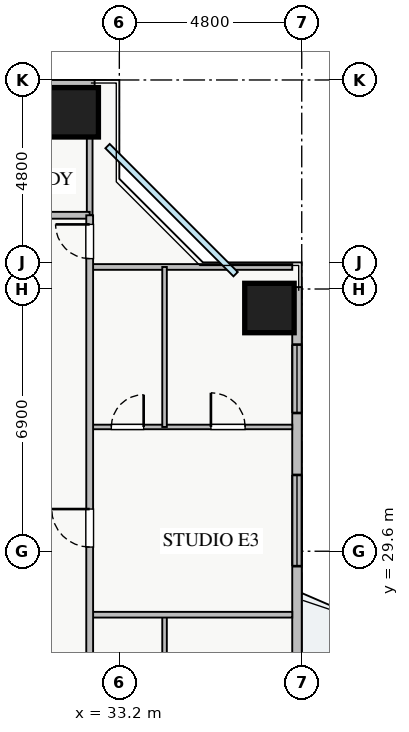
"""IFC4 building model, lengths in metres.
Left out: names, types, materials, properties, quantities, classifications, styles, units other than length and angle.
Written with IfcOpenShell. Run it as: python <this file> out.ifc"""

import sys

from ifc_helpers import new_model, si_unit, direction, frame, frame_2d, origin, origin_2d, place, context, subcontext, project, spatial, rectangle, extrude, source, transform, mapped, element, fill, save


model = new_model("IFC4")
c1 = context("Model", 3, precision=1e-05, world=origin(), true_north=direction((0.0, 1.0)))
c2 = subcontext(c1, "Body", "Model", "MODEL_VIEW")
j1 = project(units=[si_unit("LENGTHUNIT", "METRE"), si_unit("PLANEANGLEUNIT", "RADIAN")], contexts=[c1])
p1 = place(None, origin())
s1 = spatial("IfcSite", under=j1, at=p1, CompositionType="ELEMENT")
p2 = place(p1, origin())
s2 = spatial("IfcBuilding", under=s1, at=p2, CompositionType="ELEMENT")
p3 = place(p2, frame((0.0, 0.0, 79.5)))
s3 = spatial("IfcBuildingStorey", under=s2, at=p3, CompositionType="ELEMENT", Elevation=79.5)
m1 = source(origin(), c2, "Body", "SweptSolid", [
    extrude(rectangle(XDim=1.3, YDim=1.3, at=origin_2d()), origin(), (0.0, 0.0, 1.0), 3.25),
])
for number, where, z_axis, x_axis in (
    (1, (37.15, 36.0, 0.0), (0.0, 0.0, 1.0), (1.0, 0.0, 0.0)),
    (2, (32.0, 41.15, 0.0), (0.0, 0.0, 1.0), (1.0, 0.0, 0.0)),
):
    element("IfcColumn", number, at=place(p3, frame(where, z_axis=z_axis, x_axis=x_axis)), inside=s3, PredefinedType="COLUMN", context=c2, shape_type="MappedRepresentation", body=[
        mapped(m1, transform((0.0, 0.0, 0.0), x_axis=(1.0, 0.0, 0.0), y_axis=(0.0, 1.0, 0.0), z_axis=(0.0, 0.0, 1.0), scale=1.0)),
    ])
p4 = place(p3, frame((5.45, 41.875, 0.0), z_axis=(0.0, 0.0, 1.0), x_axis=(1.0, 0.0, 0.0)))
e3 = element("IfcWall", 3, at=p4, inside=s3, PredefinedType="STANDARD", context=c2, shape_type="SweptSolid", body=[
    extrude(rectangle(XDim=27.1, YDim=0.25, at=frame_2d((13.55, 0.0))), origin(), (0.0, 0.0, 1.0), 2.61),
])
p5 = place(p4, frame((14.4, 0.0, 0.0)))
e4 = element("IfcOpeningElement", 4, at=p5, cuts=e3, PredefinedType="OPENING", context=c2, shape_type="SweptSolid", body=[
    extrude(rectangle(XDim=1.2, YDim=2.1, at=frame_2d((0.6, 1.05))), frame((0.0, 0.135, 0.0), z_axis=(0.0, -1.0, 0.0), x_axis=(1.0, 0.0, 0.0)), (0.0, 0.0, 1.0), 0.27),
])
p6 = place(p4, frame((1.365, 0.0, 0.9)))
e5 = element("IfcOpeningElement", 5, at=p6, cuts=e3, PredefinedType="OPENING", context=c2, shape_type="SweptSolid", body=[
    extrude(rectangle(XDim=1.8, YDim=1.5, at=frame_2d((0.9, 0.75))), frame((0.0, 0.135, 0.0), z_axis=(0.0, -1.0, 0.0), x_axis=(1.0, 0.0, 0.0)), (0.0, 0.0, 1.0), 0.27),
])
p7 = place(p4, frame((9.263, 0.0, 0.9)))
e6 = element("IfcOpeningElement", 6, at=p7, cuts=e3, PredefinedType="OPENING", context=c2, shape_type="SweptSolid", body=[
    extrude(rectangle(XDim=1.8, YDim=1.45, at=frame_2d((0.9, 0.725))), frame((0.0, 0.135, 0.0), z_axis=(0.0, -1.0, 0.0), x_axis=(1.0, 0.0, 0.0)), (0.0, 0.0, 1.0), 0.27),
])
p8 = place(p4, frame((16.188, 0.0, 0.9)))
e7 = element("IfcOpeningElement", 7, at=p8, cuts=e3, PredefinedType="OPENING", context=c2, shape_type="SweptSolid", body=[
    extrude(rectangle(XDim=1.5, YDim=1.45, at=frame_2d((0.75, 0.725))), frame((0.0, 0.135, 0.0), z_axis=(0.0, -1.0, 0.0), x_axis=(1.0, 0.0, 0.0)), (0.0, 0.0, 1.0), 0.27),
])
p9 = place(p4, frame((22.663, 0.0, 0.9)))
e8 = element("IfcOpeningElement", 8, at=p9, cuts=e3, PredefinedType="OPENING", context=c2, shape_type="SweptSolid", body=[
    extrude(rectangle(XDim=2.1, YDim=1.48, at=frame_2d((1.05, 0.74))), frame((0.0, 0.135, 0.0), z_axis=(0.0, -1.0, 0.0), x_axis=(1.0, 0.0, 0.0)), (0.0, 0.0, 1.0), 0.27),
])
p10 = place(p4, frame((5.149, 0.0, 0.9)))
e9 = element("IfcOpeningElement", 9, at=p10, cuts=e3, PredefinedType="OPENING", context=c2, shape_type="SweptSolid", body=[
    extrude(rectangle(XDim=2.4, YDim=1.5, at=frame_2d((1.2, 0.75))), frame((0.0, 0.135, 0.0), z_axis=(0.0, -1.0, 0.0), x_axis=(1.0, 0.0, 0.0)), (0.0, 0.0, 1.0), 0.27),
])
p11 = place(p3, frame((37.875, 9.45, 0.0), z_axis=(0.0, 0.0, 1.0), x_axis=(0.0, 1.0, 0.0)))
e10 = element("IfcWall", 10, at=p11, inside=s3, PredefinedType="STANDARD", context=c2, shape_type="SweptSolid", body=[
    extrude(rectangle(XDim=27.1, YDim=0.25, at=frame_2d((13.55, 0.0))), origin(), (0.0, 0.0, 1.0), 2.61),
])
p12 = place(p11, frame((14.4, 0.0, 0.0)))
e11 = element("IfcOpeningElement", 11, at=p12, cuts=e10, PredefinedType="OPENING", context=c2, shape_type="SweptSolid", body=[
    extrude(rectangle(XDim=1.2, YDim=2.1, at=frame_2d((0.6, 1.05))), frame((0.0, 0.135, 0.0), z_axis=(0.0, -1.0, 0.0), x_axis=(1.0, 0.0, 0.0)), (0.0, 0.0, 1.0), 0.27),
])
p13 = place(p11, frame((2.188, 0.0, 0.9)))
e12 = element("IfcOpeningElement", 12, at=p13, cuts=e10, PredefinedType="OPENING", context=c2, shape_type="SweptSolid", body=[
    extrude(rectangle(XDim=2.4, YDim=1.48, at=frame_2d((1.2, 0.74))), frame((0.0, 0.135, 0.0), z_axis=(0.0, -1.0, 0.0), x_axis=(1.0, 0.0, 0.0)), (0.0, 0.0, 1.0), 0.27),
])
p14 = place(p11, frame((23.788, 0.0, 0.9)))
e13 = element("IfcOpeningElement", 13, at=p14, cuts=e10, PredefinedType="OPENING", context=c2, shape_type="SweptSolid", body=[
    extrude(rectangle(XDim=1.8, YDim=1.5, at=frame_2d((0.9, 0.75))), frame((0.0, 0.135, 0.0), z_axis=(0.0, -1.0, 0.0), x_axis=(1.0, 0.0, 0.0)), (0.0, 0.0, 1.0), 0.27),
])
p15 = place(p11, frame((19.758, 0.0, 0.9)))
e14 = element("IfcOpeningElement", 14, at=p15, cuts=e10, PredefinedType="OPENING", context=c2, shape_type="SweptSolid", body=[
    extrude(rectangle(XDim=2.4, YDim=1.5, at=frame_2d((1.2, 0.75))), frame((0.0, 0.135, 0.0), z_axis=(0.0, -1.0, 0.0), x_axis=(1.0, 0.0, 0.0)), (0.0, 0.0, 1.0), 0.27),
])
p16 = place(p11, frame((8.635, 0.0, 0.9)))
e15 = element("IfcOpeningElement", 15, at=p16, cuts=e10, PredefinedType="OPENING", context=c2, shape_type="SweptSolid", body=[
    extrude(rectangle(XDim=0.9, YDim=1.2, at=frame_2d((0.45, 0.6))), frame((0.0, 0.135, 0.0), z_axis=(0.0, -1.0, 0.0), x_axis=(1.0, 0.0, 0.0)), (0.0, 0.0, 1.0), 0.27),
])
p17 = place(p3, frame((32.42, 38.44, 0.0), z_axis=(0.0, 0.0, 1.0), x_axis=(0.0, 1.0, 0.0)))
e16 = element("IfcWall", 16, at=p17, inside=s3, PredefinedType="PARTITIONING", context=c2, shape_type="SweptSolid", body=[
    extrude(rectangle(XDim=3.31, YDim=0.15, at=frame_2d((1.655, 0.0))), origin(), (0.0, 0.0, 1.0), 3.07),
])
p18 = place(p3, frame((8.85, 38.44, 0.0), z_axis=(0.0, 0.0, 1.0), x_axis=(1.0, 0.0, 0.0)))
e17 = element("IfcWall", 17, at=p18, inside=s3, PredefinedType="PARTITIONING", context=c2, shape_type="SweptSolid", body=[
    extrude(rectangle(XDim=23.57, YDim=0.18, at=frame_2d((11.785, 0.0))), origin(), (0.0, 0.0, 1.0), 3.07),
])
p19 = place(p18, frame((4.625, 0.0, 0.0)))
e18 = element("IfcOpeningElement", 18, at=p19, cuts=e17, PredefinedType="OPENING", context=c2, shape_type="SweptSolid", body=[
    extrude(rectangle(XDim=1.0, YDim=2.05, at=frame_2d((0.5, 1.025))), frame((0.0, 0.1, 0.0), z_axis=(0.0, -1.0, 0.0), x_axis=(1.0, 0.0, 0.0)), (0.0, 0.0, 1.0), 0.2),
])
p20 = place(p18, frame((16.41, 0.0, 0.0)))
e19 = element("IfcOpeningElement", 19, at=p20, cuts=e17, PredefinedType="OPENING", context=c2, shape_type="SweptSolid", body=[
    extrude(rectangle(XDim=1.0, YDim=2.05, at=frame_2d((0.5, 1.025))), frame((0.0, 0.1, 0.0), z_axis=(0.0, -1.0, 0.0), x_axis=(1.0, 0.0, 0.0)), (0.0, 0.0, 1.0), 0.2),
])
p21 = place(p3, frame((32.42, 37.08, 0.0), z_axis=(0.0, 0.0, 1.0), x_axis=(1.0, 0.0, 0.0)))
e20 = element("IfcWall", 20, at=p21, inside=s3, PredefinedType="PARTITIONING", context=c2, shape_type="SweptSolid", body=[
    extrude(rectangle(XDim=5.33, YDim=0.15, at=frame_2d((2.665, 0.0))), origin(), (0.0, 0.0, 1.0), 3.07),
])
p22 = place(p3, frame((34.39, 23.1, 0.0), z_axis=(0.0, 0.0, 1.0), x_axis=(0.0, 1.0, 0.0)))
e21 = element("IfcWall", 21, at=p22, inside=s3, PredefinedType="PLUMBINGWALL", context=c2, shape_type="SweptSolid", body=[
    extrude(rectangle(XDim=4.83, YDim=0.12, at=frame_2d((2.415, 0.0))), origin(), (0.0, 0.0, 1.0), 3.07),
])
p23 = place(p3, frame((32.42, 32.87, 0.0), z_axis=(0.0, 0.0, 1.0), x_axis=(1.0, 0.0, 0.0)))
e22 = element("IfcWall", 22, at=p23, inside=s3, PredefinedType="PLUMBINGWALL", context=c2, shape_type="SweptSolid", body=[
    extrude(rectangle(XDim=5.33, YDim=0.12, at=frame_2d((2.665, 0.0))), origin(), (0.0, 0.0, 1.0), 3.07),
])
p24 = place(p23, frame((0.57, 0.0, 0.0)))
e23 = element("IfcOpeningElement", 23, at=p24, cuts=e22, PredefinedType="OPENING", context=c2, shape_type="SweptSolid", body=[
    extrude(rectangle(XDim=0.85, YDim=2.05, at=frame_2d((0.425, 1.025))), frame((0.0, 0.07, 0.0), z_axis=(0.0, -1.0, 0.0), x_axis=(1.0, 0.0, 0.0)), (0.0, 0.0, 1.0), 0.14),
])
p25 = place(p23, frame((3.19, 0.0, 0.0)))
e24 = element("IfcOpeningElement", 24, at=p25, cuts=e22, PredefinedType="OPENING", context=c2, shape_type="SweptSolid", body=[
    extrude(rectangle(XDim=0.9, YDim=2.05, at=frame_2d((0.45, 1.025))), frame((0.0, 0.07, 0.0), z_axis=(0.0, -1.0, 0.0), x_axis=(1.0, 0.0, 0.0)), (0.0, 0.0, 1.0), 0.14),
])
p26 = place(p3, frame((34.39, 32.87, 0.0), z_axis=(0.0, 0.0, 1.0), x_axis=(0.0, 1.0, 0.0)))
e25 = element("IfcWall", 25, at=p26, inside=s3, PredefinedType="PLUMBINGWALL", context=c2, shape_type="SweptSolid", body=[
    extrude(rectangle(XDim=4.21, YDim=0.12, at=frame_2d((2.105, 0.0))), origin(), (0.0, 0.0, 1.0), 3.07),
])
p27 = place(p3, frame((32.42, 27.93, 0.0), z_axis=(0.0, 0.0, 1.0), x_axis=(1.0, 0.0, 0.0)))
e26 = element("IfcWall", 26, at=p27, inside=s3, PredefinedType="PARTITIONING", context=c2, shape_type="SweptSolid", body=[
    extrude(rectangle(XDim=5.33, YDim=0.15, at=frame_2d((2.665, 0.0))), origin(), (0.0, 0.0, 1.0), 2.765),
])
p28 = place(p3, frame((32.42, 7.21, 0.0), z_axis=(0.0, 0.0, 1.0), x_axis=(0.0, 1.0, 0.0)))
e27 = element("IfcWall", 27, at=p28, inside=s3, PredefinedType="PARTITIONING", context=c2, shape_type="SweptSolid", body=[
    extrude(rectangle(XDim=31.23, YDim=0.18, at=frame_2d((15.615, 0.0))), origin(), (0.0, 0.0, 1.0), 2.821),
])
p29 = place(p28, frame((30.09, 0.0, 0.0)))
e28 = element("IfcOpeningElement", 28, at=p29, cuts=e27, PredefinedType="OPENING", context=c2, shape_type="SweptSolid", body=[
    extrude(rectangle(XDim=0.9, YDim=2.05, at=frame_2d((0.45, 1.025))), frame((0.0, 0.1, 0.0), z_axis=(0.0, -1.0, 0.0), x_axis=(1.0, 0.0, 0.0)), (0.0, 0.0, 1.0), 0.2),
])
p30 = place(p28, frame((0.415, 0.0, 0.0)))
e29 = element("IfcOpeningElement", 29, at=p30, cuts=e27, PredefinedType="OPENING", context=c2, shape_type="SweptSolid", body=[
    extrude(rectangle(XDim=0.9, YDim=2.05, at=frame_2d((0.45, 1.025))), frame((0.0, 0.1, 0.0), z_axis=(0.0, -1.0, 0.0), x_axis=(1.0, 0.0, 0.0)), (0.0, 0.0, 1.0), 0.2),
])
p31 = place(p28, frame((5.675, 0.0, 0.0)))
e30 = element("IfcOpeningElement", 30, at=p31, cuts=e27, PredefinedType="OPENING", context=c2, shape_type="SweptSolid", body=[
    extrude(rectangle(XDim=1.0, YDim=2.05, at=frame_2d((0.5, 1.025))), frame((0.0, 0.1, 0.0), z_axis=(0.0, -1.0, 0.0), x_axis=(1.0, 0.0, 0.0)), (0.0, 0.0, 1.0), 0.2),
])
p32 = place(p28, frame((12.575, 0.0, 0.0)))
e31 = element("IfcOpeningElement", 31, at=p32, cuts=e27, PredefinedType="OPENING", context=c2, shape_type="SweptSolid", body=[
    extrude(rectangle(XDim=1.0, YDim=2.05, at=frame_2d((0.5, 1.025))), frame((0.0, 0.1, 0.0), z_axis=(0.0, -1.0, 0.0), x_axis=(1.0, 0.0, 0.0)), (0.0, 0.0, 1.0), 0.2),
])
p33 = place(p28, frame((22.5, 0.0, 0.0)))
e32 = element("IfcOpeningElement", 32, at=p33, cuts=e27, PredefinedType="OPENING", context=c2, shape_type="SweptSolid", body=[
    extrude(rectangle(XDim=1.0, YDim=2.05, at=frame_2d((0.5, 1.025))), frame((0.0, 0.1, 0.0), z_axis=(0.0, -1.0, 0.0), x_axis=(1.0, 0.0, 0.0)), (0.0, 0.0, 1.0), 0.2),
])
m2 = source(origin(), c2, "Body", "SweptSolid", [
    extrude(rectangle(XDim=1.8, YDim=1.5, at=frame_2d((0.9, 0.75))), frame((0.0, 0.03, 0.0), z_axis=(0.0, -1.0, 0.0), x_axis=(1.0, 0.0, 0.0)), (0.0, 0.0, 1.0), 0.06),
])
p34 = place(p14, origin())
e33 = element("IfcWindow", 33, at=p34, inside=s3, PartitioningType="TRIPLE_PANEL_VERTICAL", PredefinedType="WINDOW", context=c2, shape_type="MappedRepresentation", body=[
    mapped(m2, transform((0.0, 0.0, 0.0), x_axis=(1.0, 0.0, 0.0), y_axis=(0.0, 1.0, 0.0), z_axis=(0.0, 0.0, 1.0), scale=1.0)),
])
fill(e13, e33)
m3 = source(origin(), c2, "Body", "SweptSolid", [
    extrude(rectangle(XDim=0.85, YDim=2.05, at=frame_2d((0.425, 1.025))), frame((0.0, 0.025, 0.0), z_axis=(0.0, -1.0, 0.0), x_axis=(1.0, 0.0, 0.0)), (0.0, 0.0, 1.0), 0.05),
])
p35 = place(p24, origin())
e34 = element("IfcDoor", 34, at=p35, inside=s3, OperationType="SINGLE_SWING_RIGHT", PredefinedType="DOOR", context=c2, shape_type="MappedRepresentation", body=[
    mapped(m3, transform((0.0, 0.0, 0.0), x_axis=(1.0, 0.0, 0.0), y_axis=(0.0, 1.0, 0.0), z_axis=(0.0, 0.0, 1.0), scale=1.0)),
])
fill(e23, e34)
m4 = source(origin(), c2, "Body", "SweptSolid", [
    extrude(rectangle(XDim=0.9, YDim=2.05, at=frame_2d((0.45, 1.025))), frame((0.0, 0.025, 0.0), z_axis=(0.0, -1.0, 0.0), x_axis=(1.0, 0.0, 0.0)), (0.0, 0.0, 1.0), 0.05),
])
p36 = place(p25, origin())
e35 = element("IfcDoor", 35, at=p36, inside=s3, OperationType="SINGLE_SWING_LEFT", PredefinedType="DOOR", context=c2, shape_type="MappedRepresentation", body=[
    mapped(m4, transform((0.0, 0.0, 0.0), x_axis=(1.0, 0.0, 0.0), y_axis=(0.0, 1.0, 0.0), z_axis=(0.0, 0.0, 1.0), scale=1.0)),
])
fill(e24, e35)
p37 = place(p29, origin())
e36 = element("IfcDoor", 36, at=p37, inside=s3, OperationType="SINGLE_SWING_RIGHT", PredefinedType="DOOR", context=c2, shape_type="MappedRepresentation", body=[
    mapped(m4, transform((0.0, 0.0, 0.0), x_axis=(1.0, 0.0, 0.0), y_axis=(0.0, 1.0, 0.0), z_axis=(0.0, 0.0, 1.0), scale=1.0)),
])
fill(e28, e36)
m5 = source(origin(), c2, "Body", "SweptSolid", [
    extrude(rectangle(XDim=1.0, YDim=2.05, at=frame_2d((0.5, 1.025))), frame((0.0, 0.025, 0.0), z_axis=(0.0, -1.0, 0.0), x_axis=(1.0, 0.0, 0.0)), (0.0, 0.0, 1.0), 0.05),
])
p38 = place(p33, origin())
e37 = element("IfcDoor", 37, at=p38, inside=s3, OperationType="SINGLE_SWING_RIGHT", PredefinedType="DOOR", context=c2, shape_type="MappedRepresentation", body=[
    mapped(m5, transform((0.0, 0.0, 0.0), x_axis=(1.0, 0.0, 0.0), y_axis=(0.0, 1.0, 0.0), z_axis=(0.0, 0.0, 1.0), scale=1.0)),
])
fill(e32, e37)
m6 = source(origin(), c2, "Body", "SweptSolid", [
    extrude(rectangle(XDim=2.4, YDim=1.5, at=frame_2d((1.2, 0.75))), frame((0.0, 0.03, 0.0), z_axis=(0.0, -1.0, 0.0), x_axis=(1.0, 0.0, 0.0)), (0.0, 0.0, 1.0), 0.06),
])
p39 = place(p15, origin())
e38 = element("IfcWindow", 38, at=p39, inside=s3, PartitioningType="TRIPLE_PANEL_VERTICAL", PredefinedType="WINDOW", context=c2, shape_type="MappedRepresentation", body=[
    mapped(m6, transform((0.0, 0.0, 0.0), x_axis=(1.0, 0.0, 0.0), y_axis=(0.0, 1.0, 0.0), z_axis=(0.0, 0.0, 1.0), scale=1.0)),
])
fill(e14, e38)
save(model, sys.argv[1])
